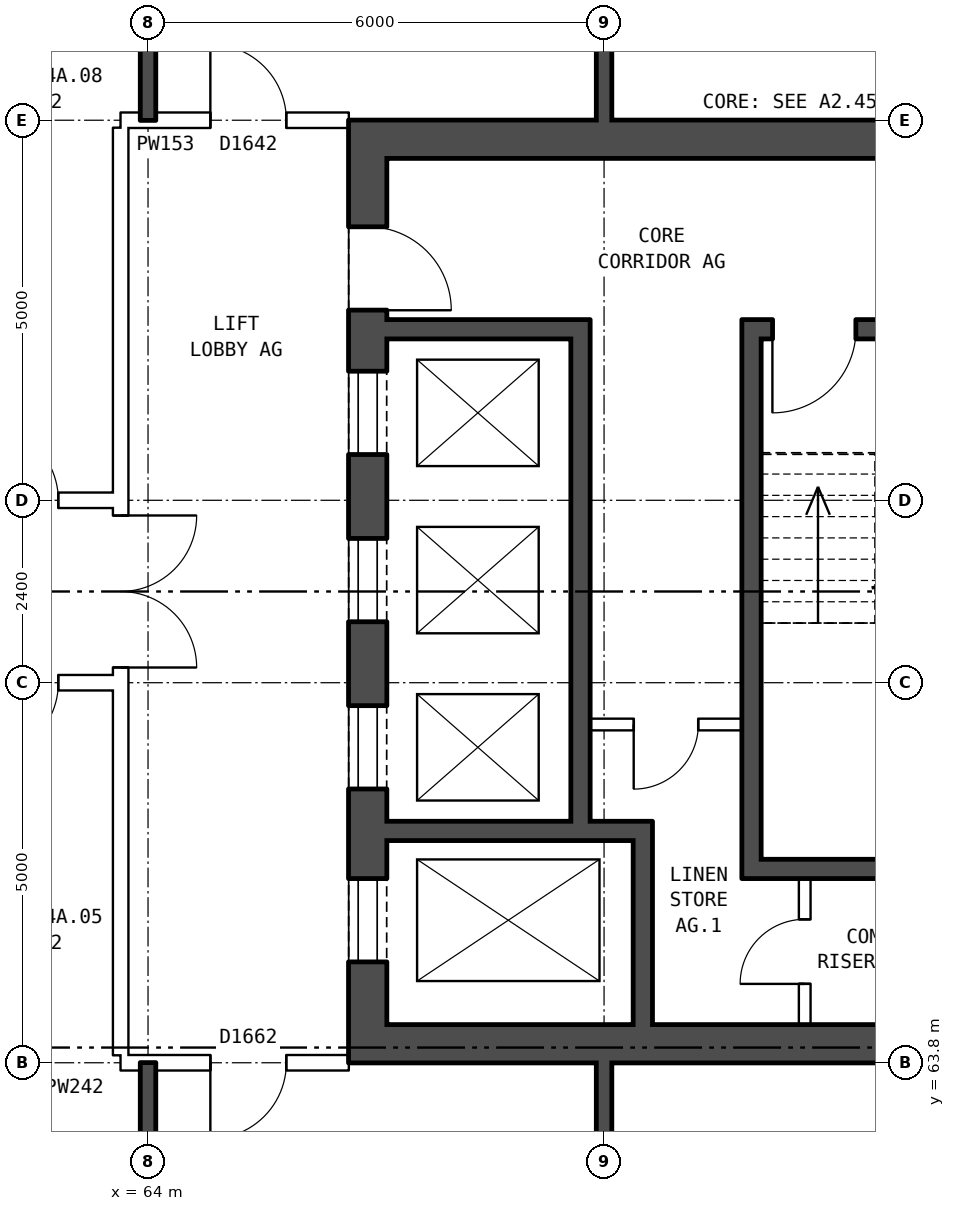
"""IFC4 building model, lengths in metres.
Left out: names, types, materials, properties, quantities, classifications, styles, units other than length and angle.
Written with IfcOpenShell. Run it as: python <this file> out.ifc"""

import sys

from ifc_helpers import new_model, si_unit, direction, frame, frame_2d, origin, place, context, subcontext, project, spatial, rectangle, extrude, element, fill, save


model = new_model("IFC4")
c1 = context("Model", 3, precision=1e-05, world=origin(), true_north=direction((0.0, 1.0)))
c2 = subcontext(c1, "Body", "Model", "MODEL_VIEW")
j1 = project(units=[si_unit("LENGTHUNIT", "METRE"), si_unit("PLANEANGLEUNIT", "RADIAN")], contexts=[c1])
p1 = place(None, origin())
s1 = spatial("IfcSite", under=j1, at=p1, CompositionType="ELEMENT")
p2 = place(p1, origin())
s2 = spatial("IfcBuilding", under=s1, at=p2, CompositionType="ELEMENT")
p3 = place(p2, frame((0.0, 0.0, 157.8)))
s3 = spatial("IfcBuildingStorey", under=s2, at=p3, CompositionType="ELEMENT", Elevation=157.8)
p4 = place(p3, frame((66.89, 63.8, 0.0), z_axis=(0.0, 0.0, 1.0), x_axis=(0.0, 1.0, 0.0)))
e1 = element("IfcWall", 1, at=p4, inside=s3, PredefinedType="SHEAR", context=c2, shape_type="SweptSolid", body=[
    extrude(rectangle(XDim=12.4, YDim=0.5, at=frame_2d((6.2, 0.0))), origin(), (0.0, 0.0, 1.0), 2.85),
])
p5 = place(p4, frame((1.325, 0.0, 0.0)))
e2 = element("IfcOpeningElement", 2, at=p5, cuts=e1, PredefinedType="OPENING", context=c2, shape_type="SweptSolid", body=[
    extrude(rectangle(XDim=1.1, YDim=2.1, at=frame_2d((0.55, 1.05))), frame((0.0, 0.26, 0.0), z_axis=(0.0, -1.0, 0.0), x_axis=(1.0, 0.0, 0.0)), (0.0, 0.0, 1.0), 0.52),
])
p6 = place(p4, frame((3.6, 0.0, 0.0)))
e3 = element("IfcOpeningElement", 3, at=p6, cuts=e1, PredefinedType="OPENING", context=c2, shape_type="SweptSolid", body=[
    extrude(rectangle(XDim=1.1, YDim=2.1, at=frame_2d((0.55, 1.05))), frame((0.0, 0.26, 0.0), z_axis=(0.0, -1.0, 0.0), x_axis=(1.0, 0.0, 0.0)), (0.0, 0.0, 1.0), 0.52),
])
p7 = place(p4, frame((5.8, 0.0, 0.0)))
e4 = element("IfcOpeningElement", 4, at=p7, cuts=e1, PredefinedType="OPENING", context=c2, shape_type="SweptSolid", body=[
    extrude(rectangle(XDim=1.1, YDim=2.1, at=frame_2d((0.55, 1.05))), frame((0.0, 0.26, 0.0), z_axis=(0.0, -1.0, 0.0), x_axis=(1.0, 0.0, 0.0)), (0.0, 0.0, 1.0), 0.52),
])
p8 = place(p4, frame((8.0, 0.0, 0.0)))
e5 = element("IfcOpeningElement", 5, at=p8, cuts=e1, PredefinedType="OPENING", context=c2, shape_type="SweptSolid", body=[
    extrude(rectangle(XDim=1.1, YDim=2.1, at=frame_2d((0.55, 1.05))), frame((0.0, 0.26, 0.0), z_axis=(0.0, -1.0, 0.0), x_axis=(1.0, 0.0, 0.0)), (0.0, 0.0, 1.0), 0.52),
])
p9 = place(p4, frame((9.9, 0.0, 0.0)))
e6 = element("IfcOpeningElement", 6, at=p9, cuts=e1, PredefinedType="OPENING", context=c2, shape_type="SweptSolid", body=[
    extrude(rectangle(XDim=1.1, YDim=2.1, at=frame_2d((0.55, 1.05))), frame((0.0, 0.26, 0.0), z_axis=(0.0, -1.0, 0.0), x_axis=(1.0, 0.0, 0.0)), (0.0, 0.0, 1.0), 0.52),
])
for number, where, z_axis, x_axis in (
    (7, (67.14, 64.05, 0.0), (0.0, 0.0, 1.0), (1.0, 0.0, 0.0)),
    (8, (67.14, 75.95, 0.0), (0.0, 0.0, 1.0), (1.0, 0.0, 0.0)),
):
    element("IfcWall", number, at=place(p3, frame(where, z_axis=z_axis, x_axis=x_axis)), inside=s3, PredefinedType="SHEAR", context=c2, shape_type="SweptSolid", body=[
        extrude(rectangle(XDim=8.0, YDim=0.5, at=frame_2d((4.0, 0.0))), origin(), (0.0, 0.0, 1.0), 2.85),
    ])
p10 = place(p3, frame((72.065, 66.35, 0.0), z_axis=(0.0, 0.0, 1.0), x_axis=(1.0, 0.0, 0.0)))
e9 = element("IfcWall", 9, at=p10, inside=s3, PredefinedType="SHEAR", context=c2, shape_type="SweptSolid", body=[
    extrude(rectangle(XDim=3.075, YDim=0.25, at=frame_2d((1.538, 0.0))), origin(), (0.0, 0.0, 1.0), 2.85),
])
p11 = place(p3, frame((67.14, 66.85, 0.0), z_axis=(0.0, 0.0, 1.0), x_axis=(1.0, 0.0, 0.0)))
e10 = element("IfcWall", 10, at=p11, inside=s3, PredefinedType="SHEAR", context=c2, shape_type="SweptSolid", body=[
    extrude(rectangle(XDim=3.495, YDim=0.25, at=frame_2d((1.748, 0.0))), origin(), (0.0, 0.0, 1.0), 2.85),
])
p12 = place(p3, frame((69.815, 68.25, 0.0), z_axis=(0.0, 0.0, 1.0), x_axis=(1.0, 0.0, 0.0)))
e11 = element("IfcWall", 11, at=p12, inside=s3, PredefinedType="PARTITIONING", context=c2, shape_type="SweptSolid", body=[
    extrude(rectangle(XDim=2.0, YDim=0.15, at=frame_2d((1.0, 0.0))), origin(), (0.0, 0.0, 1.0), 2.85),
])
p13 = place(p12, frame((0.575, 0.0, 0.0)))
e12 = element("IfcOpeningElement", 12, at=p13, cuts=e11, PredefinedType="OPENING", context=c2, shape_type="SweptSolid", body=[
    extrude(rectangle(XDim=0.85, YDim=2.1, at=frame_2d((0.425, 1.05))), frame((0.0, 0.085, 0.0), z_axis=(0.0, -1.0, 0.0), x_axis=(1.0, 0.0, 0.0)), (0.0, 0.0, 1.0), 0.17),
])
p14 = place(p3, frame((67.14, 73.45, 0.0), z_axis=(0.0, 0.0, 1.0), x_axis=(1.0, 0.0, 0.0)))
e13 = element("IfcWall", 13, at=p14, inside=s3, PredefinedType="SHEAR", context=c2, shape_type="SweptSolid", body=[
    extrude(rectangle(XDim=2.425, YDim=0.25, at=frame_2d((1.212, 0.0))), origin(), (0.0, 0.0, 1.0), 2.85),
])
p15 = place(p3, frame((72.065, 73.45, 0.0), z_axis=(0.0, 0.0, 1.0), x_axis=(1.0, 0.0, 0.0)))
e14 = element("IfcWall", 14, at=p15, inside=s3, PredefinedType="SHEAR", context=c2, shape_type="SweptSolid", body=[
    extrude(rectangle(XDim=3.075, YDim=0.25, at=frame_2d((1.538, 0.0))), origin(), (0.0, 0.0, 1.0), 2.85),
])
p16 = place(p15, frame((0.15, 0.0, 0.0)))
e15 = element("IfcOpeningElement", 15, at=p16, cuts=e14, PredefinedType="OPENING", context=c2, shape_type="SweptSolid", body=[
    extrude(rectangle(XDim=1.1, YDim=2.1, at=frame_2d((0.55, 1.05))), frame((0.0, 0.135, 0.0), z_axis=(0.0, -1.0, 0.0), x_axis=(1.0, 0.0, 0.0)), (0.0, 0.0, 1.0), 0.27),
])
p17 = place(p3, frame((69.69, 66.975, 0.0), z_axis=(0.0, 0.0, 1.0), x_axis=(0.0, 1.0, 0.0)))
e16 = element("IfcWall", 16, at=p17, inside=s3, PredefinedType="SHEAR", context=c2, shape_type="SweptSolid", body=[
    extrude(rectangle(XDim=6.6, YDim=0.25, at=frame_2d((3.3, 0.0))), origin(), (0.0, 0.0, 1.0), 2.85),
])
p18 = place(p3, frame((70.51, 64.3, 0.0), z_axis=(0.0, 0.0, 1.0), x_axis=(0.0, 1.0, 0.0)))
e17 = element("IfcWall", 17, at=p18, inside=s3, PredefinedType="SHEAR", context=c2, shape_type="SweptSolid", body=[
    extrude(rectangle(XDim=2.425, YDim=0.25, at=frame_2d((1.212, 0.0))), origin(), (0.0, 0.0, 1.0), 2.85),
])
p19 = place(p3, frame((71.94, 66.225, 0.0), z_axis=(0.0, 0.0, 1.0), x_axis=(0.0, 1.0, 0.0)))
e18 = element("IfcWall", 18, at=p19, inside=s3, PredefinedType="SHEAR", context=c2, shape_type="SweptSolid", body=[
    extrude(rectangle(XDim=7.35, YDim=0.25, at=frame_2d((3.675, 0.0))), origin(), (0.0, 0.0, 1.0), 2.85),
])
p20 = place(p3, frame((72.64, 64.3, 0.0), z_axis=(0.0, 0.0, 1.0), x_axis=(0.0, 1.0, 0.0)))
e19 = element("IfcWall", 19, at=p20, inside=s3, PredefinedType="PARTITIONING", context=c2, shape_type="SweptSolid", body=[
    extrude(rectangle(XDim=1.925, YDim=0.15, at=frame_2d((0.962, 0.0))), origin(), (0.0, 0.0, 1.0), 2.85),
])
p21 = place(p20, frame((0.538, 0.0, 0.0)))
e20 = element("IfcOpeningElement", 20, at=p21, cuts=e19, PredefinedType="OPENING", context=c2, shape_type="SweptSolid", body=[
    extrude(rectangle(XDim=0.85, YDim=2.1, at=frame_2d((0.425, 1.05))), frame((0.0, 0.085, 0.0), z_axis=(0.0, -1.0, 0.0), x_axis=(1.0, 0.0, 0.0)), (0.0, 0.0, 1.0), 0.17),
])
p22 = place(p3, frame((63.64, 63.9, 0.0), z_axis=(0.0, 0.0, 1.0), x_axis=(0.0, 1.0, 0.0)))
e21 = element("IfcWall", 21, at=p22, inside=s3, PredefinedType="PARTITIONING", context=c2, shape_type="SweptSolid", body=[
    extrude(rectangle(XDim=12.2, YDim=0.2, at=frame_2d((6.1, 0.0))), origin(), (0.0, 0.0, 1.0), 2.85),
])
p23 = place(p22, frame((5.1, 0.0, 0.0)))
e22 = element("IfcOpeningElement", 22, at=p23, cuts=e21, PredefinedType="OPENING", context=c2, shape_type="SweptSolid", body=[
    extrude(rectangle(XDim=2.0, YDim=2.1, at=frame_2d((1.0, 1.05))), frame((0.0, 0.11, 0.0), z_axis=(0.0, -1.0, 0.0), x_axis=(1.0, 0.0, 0.0)), (0.0, 0.0, 1.0), 0.22),
])
p24 = place(p3, frame((63.64, 63.8, 0.0), z_axis=(0.0, 0.0, 1.0), x_axis=(1.0, 0.0, 0.0)))
e23 = element("IfcWall", 23, at=p24, inside=s3, PredefinedType="PARTITIONING", context=c2, shape_type="SweptSolid", body=[
    extrude(rectangle(XDim=3.0, YDim=0.2, at=frame_2d((1.5, 0.0))), origin(), (0.0, 0.0, 1.0), 2.85),
])
p25 = place(p24, frame((1.18, 0.0, 0.0)))
e24 = element("IfcOpeningElement", 24, at=p25, cuts=e23, PredefinedType="OPENING", context=c2, shape_type="SweptSolid", body=[
    extrude(rectangle(XDim=1.0, YDim=2.1, at=frame_2d((0.5, 1.05))), frame((0.0, 0.11, 0.0), z_axis=(0.0, -1.0, 0.0), x_axis=(1.0, 0.0, 0.0)), (0.0, 0.0, 1.0), 0.22),
])
p26 = place(p3, frame((44.36, 68.8, 0.0), z_axis=(0.0, 0.0, 1.0), x_axis=(1.0, 0.0, 0.0)))
e25 = element("IfcWall", 25, at=p26, inside=s3, PredefinedType="PARTITIONING", context=c2, shape_type="SweptSolid", body=[
    extrude(rectangle(XDim=19.28, YDim=0.2, at=frame_2d((9.64, 0.0))), origin(), (0.0, 0.0, 1.0), 2.85),
])
p27 = place(p26, frame((17.46, 0.0, 0.0)))
e26 = element("IfcOpeningElement", 26, at=p27, cuts=e25, PredefinedType="OPENING", context=c2, shape_type="SweptSolid", body=[
    extrude(rectangle(XDim=1.0, YDim=2.1, at=frame_2d((0.5, 1.05))), frame((0.0, 0.11, 0.0), z_axis=(0.0, -1.0, 0.0), x_axis=(1.0, 0.0, 0.0)), (0.0, 0.0, 1.0), 0.22),
])
p28 = place(p26, frame((8.64, 0.0, 0.0)))
e27 = element("IfcOpeningElement", 27, at=p28, cuts=e25, PredefinedType="OPENING", context=c2, shape_type="SweptSolid", body=[
    extrude(rectangle(XDim=1.0, YDim=2.1, at=frame_2d((0.5, 1.05))), frame((0.0, 0.11, 0.0), z_axis=(0.0, -1.0, 0.0), x_axis=(1.0, 0.0, 0.0)), (0.0, 0.0, 1.0), 0.22),
])
p29 = place(p26, frame((2.64, 0.0, 0.0)))
e28 = element("IfcOpeningElement", 28, at=p29, cuts=e25, PredefinedType="OPENING", context=c2, shape_type="SweptSolid", body=[
    extrude(rectangle(XDim=1.0, YDim=2.1, at=frame_2d((0.5, 1.05))), frame((0.0, 0.11, 0.0), z_axis=(0.0, -1.0, 0.0), x_axis=(1.0, 0.0, 0.0)), (0.0, 0.0, 1.0), 0.22),
])
p30 = place(p3, frame((44.36, 71.2, 0.0), z_axis=(0.0, 0.0, 1.0), x_axis=(1.0, 0.0, 0.0)))
e29 = element("IfcWall", 29, at=p30, inside=s3, PredefinedType="PARTITIONING", context=c2, shape_type="SweptSolid", body=[
    extrude(rectangle(XDim=19.28, YDim=0.2, at=frame_2d((9.64, 0.0))), origin(), (0.0, 0.0, 1.0), 2.85),
])
p31 = place(p30, frame((17.46, 0.0, 0.0)))
e30 = element("IfcOpeningElement", 30, at=p31, cuts=e29, PredefinedType="OPENING", context=c2, shape_type="SweptSolid", body=[
    extrude(rectangle(XDim=1.0, YDim=2.1, at=frame_2d((0.5, 1.05))), frame((0.0, 0.11, 0.0), z_axis=(0.0, -1.0, 0.0), x_axis=(1.0, 0.0, 0.0)), (0.0, 0.0, 1.0), 0.22),
])
p32 = place(p30, frame((8.64, 0.0, 0.0)))
e31 = element("IfcOpeningElement", 31, at=p32, cuts=e29, PredefinedType="OPENING", context=c2, shape_type="SweptSolid", body=[
    extrude(rectangle(XDim=1.0, YDim=2.1, at=frame_2d((0.5, 1.05))), frame((0.0, 0.11, 0.0), z_axis=(0.0, -1.0, 0.0), x_axis=(1.0, 0.0, 0.0)), (0.0, 0.0, 1.0), 0.22),
])
p33 = place(p30, frame((2.64, 0.0, 0.0)))
e32 = element("IfcOpeningElement", 32, at=p33, cuts=e29, PredefinedType="OPENING", context=c2, shape_type="SweptSolid", body=[
    extrude(rectangle(XDim=1.0, YDim=2.1, at=frame_2d((0.5, 1.05))), frame((0.0, 0.11, 0.0), z_axis=(0.0, -1.0, 0.0), x_axis=(1.0, 0.0, 0.0)), (0.0, 0.0, 1.0), 0.22),
])
p34 = place(p3, frame((63.64, 76.2, 0.0), z_axis=(0.0, 0.0, 1.0), x_axis=(1.0, 0.0, 0.0)))
e33 = element("IfcWall", 33, at=p34, inside=s3, PredefinedType="PARTITIONING", context=c2, shape_type="SweptSolid", body=[
    extrude(rectangle(XDim=3.0, YDim=0.2, at=frame_2d((1.5, 0.0))), origin(), (0.0, 0.0, 1.0), 2.85),
])
p35 = place(p34, frame((1.18, 0.0, 0.0)))
e34 = element("IfcOpeningElement", 34, at=p35, cuts=e33, PredefinedType="OPENING", context=c2, shape_type="SweptSolid", body=[
    extrude(rectangle(XDim=1.0, YDim=2.1, at=frame_2d((0.5, 1.05))), frame((0.0, 0.11, 0.0), z_axis=(0.0, -1.0, 0.0), x_axis=(1.0, 0.0, 0.0)), (0.0, 0.0, 1.0), 0.22),
])
for number, where, z_axis, x_axis in (
    (35, (64.0, 54.36, 0.0), (0.0, 0.0, 1.0), (0.0, 1.0, 0.0)),
    (36, (64.0, 76.2, 0.0), (0.0, 0.0, 1.0), (0.0, 1.0, 0.0)),
):
    element("IfcWall", number, at=place(p3, frame(where, z_axis=z_axis, x_axis=x_axis)), inside=s3, PredefinedType="SOLIDWALL", context=c2, shape_type="SweptSolid", body=[
        extrude(rectangle(XDim=9.44, YDim=0.2, at=frame_2d((4.72, 0.0))), origin(), (0.0, 0.0, 1.0), 2.85),
    ])
p36 = place(p3, frame((70.0, 54.36, 0.0), z_axis=(0.0, 0.0, 1.0), x_axis=(0.0, 1.0, 0.0)))
e37 = element("IfcWall", 37, at=p36, inside=s3, PredefinedType="SOLIDWALL", context=c2, shape_type="SweptSolid", body=[
    extrude(rectangle(XDim=9.44, YDim=0.2, at=frame_2d((4.72, 0.0))), origin(), (0.0, 0.0, 1.0), 2.85),
])
p37 = place(p36, frame((1.37, 0.0, 0.0)))
e38 = element("IfcOpeningElement", 38, at=p37, cuts=e37, PredefinedType="OPENING", context=c2, shape_type="SweptSolid", body=[
    extrude(rectangle(XDim=0.9, YDim=2.1, at=frame_2d((0.45, 1.05))), frame((0.0, 0.11, 0.0), z_axis=(0.0, -1.0, 0.0), x_axis=(1.0, 0.0, 0.0)), (0.0, 0.0, 1.0), 0.22),
])
p38 = place(p36, frame((7.04, 0.0, 0.0)))
e39 = element("IfcOpeningElement", 39, at=p38, cuts=e37, PredefinedType="OPENING", context=c2, shape_type="SweptSolid", body=[
    extrude(rectangle(XDim=0.9, YDim=2.1, at=frame_2d((0.45, 1.05))), frame((0.0, 0.11, 0.0), z_axis=(0.0, -1.0, 0.0), x_axis=(1.0, 0.0, 0.0)), (0.0, 0.0, 1.0), 0.22),
])
p39 = place(p3, frame((70.0, 76.2, 0.0), z_axis=(0.0, 0.0, 1.0), x_axis=(0.0, 1.0, 0.0)))
e40 = element("IfcWall", 40, at=p39, inside=s3, PredefinedType="SOLIDWALL", context=c2, shape_type="SweptSolid", body=[
    extrude(rectangle(XDim=9.44, YDim=0.2, at=frame_2d((4.72, 0.0))), origin(), (0.0, 0.0, 1.0), 2.85),
])
p40 = place(p39, frame((1.5, 0.0, 0.0)))
e41 = element("IfcOpeningElement", 41, at=p40, cuts=e40, PredefinedType="OPENING", context=c2, shape_type="SweptSolid", body=[
    extrude(rectangle(XDim=0.9, YDim=2.1, at=frame_2d((0.45, 1.05))), frame((0.0, 0.11, 0.0), z_axis=(0.0, -1.0, 0.0), x_axis=(1.0, 0.0, 0.0)), (0.0, 0.0, 1.0), 0.22),
])
p41 = place(p5, origin())
e42 = element("IfcDoor", 42, at=p41, inside=s3, OperationType="DOUBLE_DOOR_SLIDING", PredefinedType="DOOR", context=c2, shape_type="SweptSolid", body=[
    extrude(rectangle(XDim=1.1, YDim=2.1, at=frame_2d((0.55, 1.05))), frame((0.0, -0.185, 0.0), z_axis=(0.0, -1.0, 0.0), x_axis=(1.0, 0.0, 0.0)), (0.0, 0.0, 1.0), 0.05),
])
fill(e2, e42)
p42 = place(p6, origin())
e43 = element("IfcDoor", 43, at=p42, inside=s3, OperationType="DOUBLE_DOOR_SLIDING", PredefinedType="DOOR", context=c2, shape_type="SweptSolid", body=[
    extrude(rectangle(XDim=1.1, YDim=2.1, at=frame_2d((0.55, 1.05))), frame((0.0, -0.185, 0.0), z_axis=(0.0, -1.0, 0.0), x_axis=(1.0, 0.0, 0.0)), (0.0, 0.0, 1.0), 0.05),
])
fill(e3, e43)
p43 = place(p7, origin())
e44 = element("IfcDoor", 44, at=p43, inside=s3, OperationType="DOUBLE_DOOR_SLIDING", PredefinedType="DOOR", context=c2, shape_type="SweptSolid", body=[
    extrude(rectangle(XDim=1.1, YDim=2.1, at=frame_2d((0.55, 1.05))), frame((0.0, -0.185, 0.0), z_axis=(0.0, -1.0, 0.0), x_axis=(1.0, 0.0, 0.0)), (0.0, 0.0, 1.0), 0.05),
])
fill(e4, e44)
p44 = place(p8, origin())
e45 = element("IfcDoor", 45, at=p44, inside=s3, OperationType="DOUBLE_DOOR_SLIDING", PredefinedType="DOOR", context=c2, shape_type="SweptSolid", body=[
    extrude(rectangle(XDim=1.1, YDim=2.1, at=frame_2d((0.55, 1.05))), frame((0.0, -0.185, 0.0), z_axis=(0.0, -1.0, 0.0), x_axis=(1.0, 0.0, 0.0)), (0.0, 0.0, 1.0), 0.05),
])
fill(e5, e45)
p45 = place(p9, frame((1.1, 0.0, 0.0), z_axis=(0.0, 0.0, 1.0), x_axis=(-1.0, 0.0, 0.0)))
e46 = element("IfcDoor", 46, at=p45, inside=s3, OperationType="SINGLE_SWING_RIGHT", PredefinedType="DOOR", context=c2, shape_type="SweptSolid", body=[
    extrude(rectangle(XDim=1.1, YDim=2.1, at=frame_2d((0.55, 1.05))), frame((0.0, 0.235, 0.0), z_axis=(0.0, -1.0, 0.0), x_axis=(1.0, 0.0, 0.0)), (0.0, 0.0, 1.0), 0.05),
])
fill(e6, e46)
p46 = place(p16, frame((1.1, 0.0, 0.0), z_axis=(0.0, 0.0, 1.0), x_axis=(-1.0, 0.0, 0.0)))
e47 = element("IfcDoor", 47, at=p46, inside=s3, OperationType="SINGLE_SWING_RIGHT", PredefinedType="DOOR", context=c2, shape_type="SweptSolid", body=[
    extrude(rectangle(XDim=1.1, YDim=2.1, at=frame_2d((0.55, 1.05))), frame((0.0, 0.025, 0.0), z_axis=(0.0, -1.0, 0.0), x_axis=(1.0, 0.0, 0.0)), (0.0, 0.0, 1.0), 0.05),
])
fill(e15, e47)
p47 = place(p13, frame((0.85, 0.0, 0.0), z_axis=(0.0, 0.0, 1.0), x_axis=(-1.0, 0.0, 0.0)))
e48 = element("IfcDoor", 48, at=p47, inside=s3, OperationType="SINGLE_SWING_RIGHT", PredefinedType="DOOR", context=c2, shape_type="SweptSolid", body=[
    extrude(rectangle(XDim=0.85, YDim=2.1, at=frame_2d((0.425, 1.05))), frame((0.0, 0.025, 0.0), z_axis=(0.0, -1.0, 0.0), x_axis=(1.0, 0.0, 0.0)), (0.0, 0.0, 1.0), 0.05),
])
fill(e12, e48)
p48 = place(p21, origin())
e49 = element("IfcDoor", 49, at=p48, inside=s3, OperationType="SINGLE_SWING_LEFT", PredefinedType="DOOR", context=c2, shape_type="SweptSolid", body=[
    extrude(rectangle(XDim=0.85, YDim=2.1, at=frame_2d((0.425, 1.05))), frame((0.0, 0.025, 0.0), z_axis=(0.0, -1.0, 0.0), x_axis=(1.0, 0.0, 0.0)), (0.0, 0.0, 1.0), 0.05),
])
fill(e20, e49)
p49 = place(p23, frame((2.0, 0.0, 0.0), z_axis=(0.0, 0.0, 1.0), x_axis=(-1.0, 0.0, 0.0)))
e50 = element("IfcDoor", 50, at=p49, inside=s3, OperationType="DOUBLE_DOOR_SINGLE_SWING", PredefinedType="DOOR", context=c2, shape_type="SweptSolid", body=[
    extrude(rectangle(XDim=2.0, YDim=2.1, at=frame_2d((1.0, 1.05))), frame((0.0, 0.025, 0.0), z_axis=(0.0, -1.0, 0.0), x_axis=(1.0, 0.0, 0.0)), (0.0, 0.0, 1.0), 0.05),
])
fill(e22, e50)
p50 = place(p25, frame((1.0, 0.0, 0.0), z_axis=(0.0, 0.0, 1.0), x_axis=(-1.0, 0.0, 0.0)))
e51 = element("IfcDoor", 51, at=p50, inside=s3, OperationType="SINGLE_SWING_RIGHT", PredefinedType="DOOR", context=c2, shape_type="SweptSolid", body=[
    extrude(rectangle(XDim=1.0, YDim=2.1, at=frame_2d((0.5, 1.05))), frame((0.0, 0.025, 0.0), z_axis=(0.0, -1.0, 0.0), x_axis=(1.0, 0.0, 0.0)), (0.0, 0.0, 1.0), 0.05),
])
fill(e24, e51)
p51 = place(p35, origin())
e52 = element("IfcDoor", 52, at=p51, inside=s3, OperationType="SINGLE_SWING_LEFT", PredefinedType="DOOR", context=c2, shape_type="SweptSolid", body=[
    extrude(rectangle(XDim=1.0, YDim=2.1, at=frame_2d((0.5, 1.05))), frame((0.0, 0.025, 0.0), z_axis=(0.0, -1.0, 0.0), x_axis=(1.0, 0.0, 0.0)), (0.0, 0.0, 1.0), 0.05),
])
fill(e34, e52)
p52 = place(p27, frame((1.0, 0.0, 0.0), z_axis=(0.0, 0.0, 1.0), x_axis=(-1.0, 0.0, 0.0)))
e53 = element("IfcDoor", 53, at=p52, inside=s3, OperationType="SINGLE_SWING_RIGHT", PredefinedType="DOOR", context=c2, shape_type="SweptSolid", body=[
    extrude(rectangle(XDim=1.0, YDim=2.1, at=frame_2d((0.5, 1.05))), frame((0.0, 0.025, 0.0), z_axis=(0.0, -1.0, 0.0), x_axis=(1.0, 0.0, 0.0)), (0.0, 0.0, 1.0), 0.05),
])
fill(e26, e53)
p53 = place(p31, origin())
e54 = element("IfcDoor", 54, at=p53, inside=s3, OperationType="SINGLE_SWING_LEFT", PredefinedType="DOOR", context=c2, shape_type="SweptSolid", body=[
    extrude(rectangle(XDim=1.0, YDim=2.1, at=frame_2d((0.5, 1.05))), frame((0.0, 0.025, 0.0), z_axis=(0.0, -1.0, 0.0), x_axis=(1.0, 0.0, 0.0)), (0.0, 0.0, 1.0), 0.05),
])
fill(e30, e54)
save(model, sys.argv[1])
